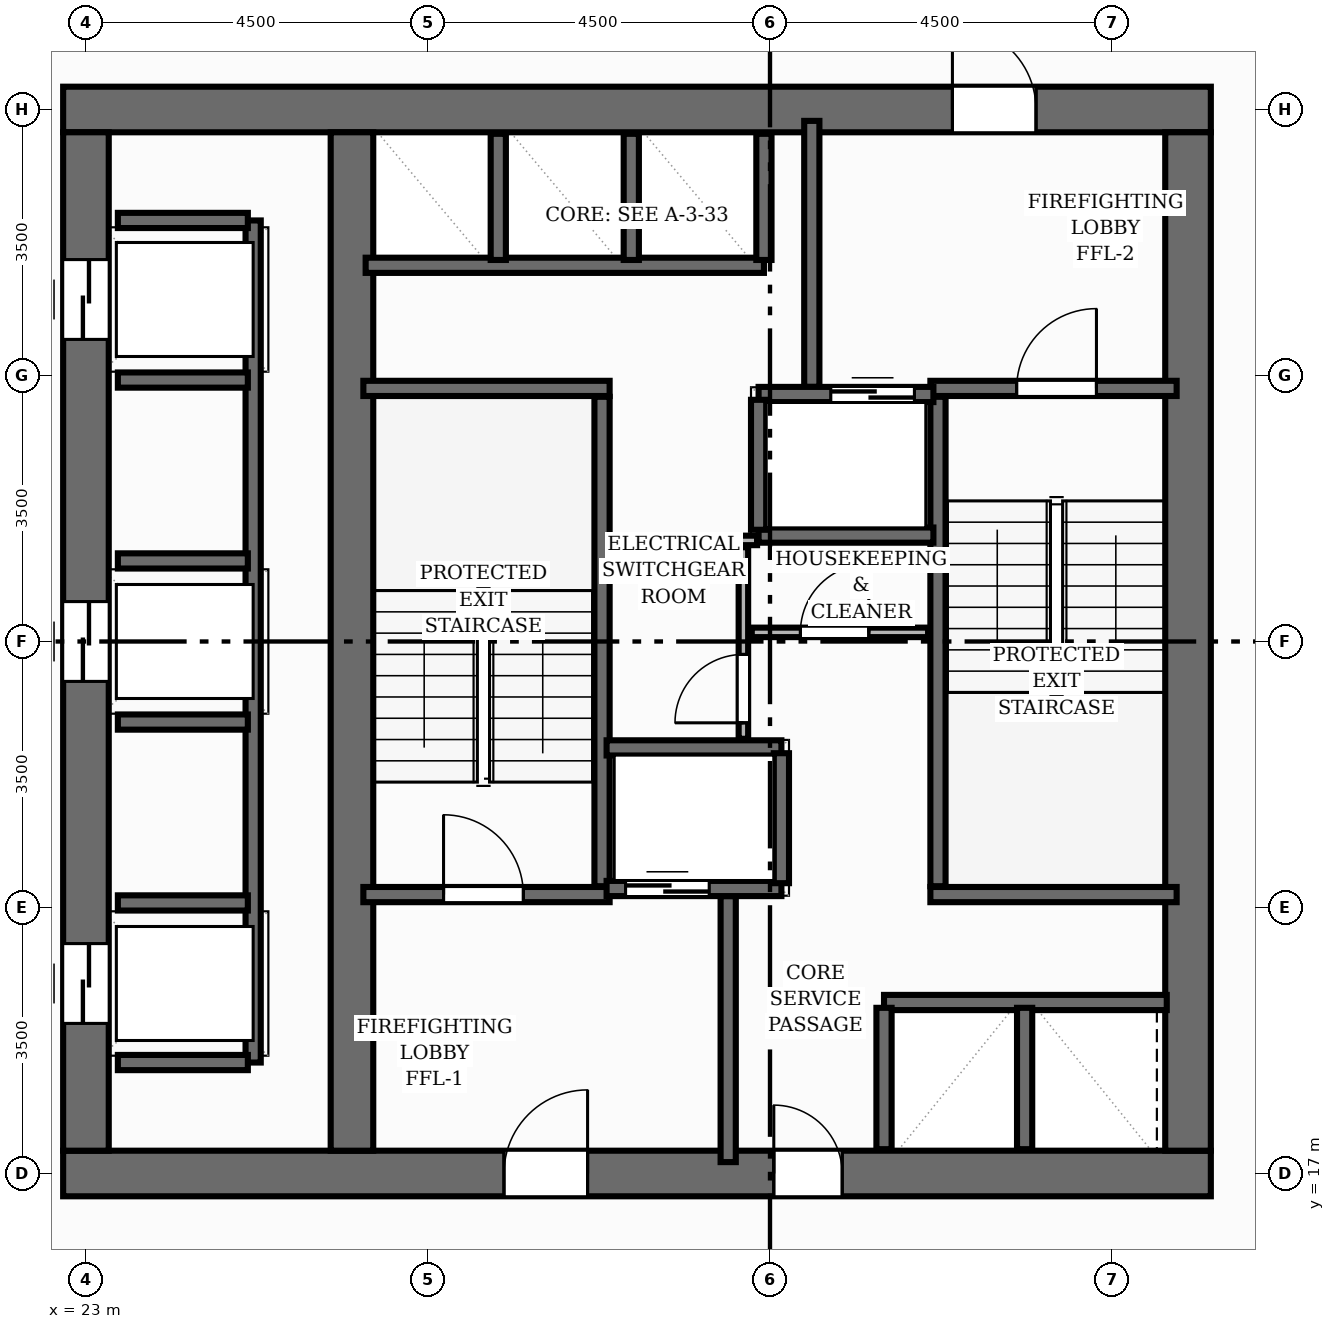
"""IFC4 building model, lengths in metres.
Left out: names, types, materials, properties, quantities, classifications, styles, units other than length and angle.
Written with IfcOpenShell. Run it as: python <this file> out.ifc"""

import sys

from ifc_helpers import new_model, si_unit, direction, frame, frame_2d, origin, place, context, subcontext, project, spatial, rectangle, extrude, element, fill, save


model = new_model("IFC4")
c1 = context("Model", 3, precision=1e-05, world=origin(), true_north=direction((0.0, 1.0)))
c2 = subcontext(c1, "Body", "Model", "MODEL_VIEW")
j1 = project(units=[si_unit("LENGTHUNIT", "METRE"), si_unit("PLANEANGLEUNIT", "RADIAN")], contexts=[c1])
p1 = place(None, origin())
s1 = spatial("IfcSite", under=j1, at=p1, CompositionType="ELEMENT")
p2 = place(p1, origin())
s2 = spatial("IfcBuilding", under=s1, at=p2, CompositionType="ELEMENT")
p3 = place(p2, frame((0.0, 0.0, 132.96)))
s3 = spatial("IfcBuildingStorey", under=s2, at=p3, CompositionType="ELEMENT", Elevation=132.96)
p4 = place(p3, frame((22.7, 17.0, 0.0), z_axis=(0.0, 0.0, 1.0), x_axis=(1.0, 0.0, 0.0)))
e1 = element("IfcWall", 1, at=p4, inside=s3, PredefinedType="SHEAR", context=c2, shape_type="SweptSolid", body=[
    extrude(rectangle(XDim=15.1, YDim=0.6, at=frame_2d((7.55, 0.0))), origin(), (0.0, 0.0, 1.0), 3.2),
])
p5 = place(p4, frame((5.8, 0.0, 0.0)))
e2 = element("IfcOpeningElement", 2, at=p5, cuts=e1, PredefinedType="OPENING", context=c2, shape_type="SweptSolid", body=[
    extrude(rectangle(XDim=1.1, YDim=2.15, at=frame_2d((0.55, 1.075))), frame((0.0, 0.31, 0.0), z_axis=(0.0, -1.0, 0.0), x_axis=(1.0, 0.0, 0.0)), (0.0, 0.0, 1.0), 0.62),
])
p6 = place(p4, frame((9.35, 0.0, 0.0)))
e3 = element("IfcOpeningElement", 3, at=p6, cuts=e1, PredefinedType="OPENING", context=c2, shape_type="SweptSolid", body=[
    extrude(rectangle(XDim=0.9, YDim=2.1, at=frame_2d((0.45, 1.05))), frame((0.0, 0.31, 0.0), z_axis=(0.0, -1.0, 0.0), x_axis=(1.0, 0.0, 0.0)), (0.0, 0.0, 1.0), 0.62),
])
p7 = place(p3, frame((22.7, 31.0, 0.0), z_axis=(0.0, 0.0, 1.0), x_axis=(1.0, 0.0, 0.0)))
e4 = element("IfcWall", 4, at=p7, inside=s3, PredefinedType="SHEAR", context=c2, shape_type="SweptSolid", body=[
    extrude(rectangle(XDim=15.1, YDim=0.6, at=frame_2d((7.55, 0.0))), origin(), (0.0, 0.0, 1.0), 3.2),
])
p8 = place(p7, frame((11.7, 0.0, 0.0)))
e5 = element("IfcOpeningElement", 5, at=p8, cuts=e4, PredefinedType="OPENING", context=c2, shape_type="SweptSolid", body=[
    extrude(rectangle(XDim=1.1, YDim=2.15, at=frame_2d((0.55, 1.075))), frame((0.0, 0.31, 0.0), z_axis=(0.0, -1.0, 0.0), x_axis=(1.0, 0.0, 0.0)), (0.0, 0.0, 1.0), 0.62),
])
p9 = place(p3, frame((23.0, 17.3, 0.0), z_axis=(0.0, 0.0, 1.0), x_axis=(0.0, 1.0, 0.0)))
e6 = element("IfcWall", 6, at=p9, inside=s3, PredefinedType="SHEAR", context=c2, shape_type="SweptSolid", body=[
    extrude(rectangle(XDim=13.4, YDim=0.6, at=frame_2d((6.7, 0.0))), origin(), (0.0, 0.0, 1.0), 3.2),
])
p10 = place(p9, frame((1.675, 0.0, 0.0)))
e7 = element("IfcOpeningElement", 7, at=p10, cuts=e6, PredefinedType="OPENING", context=c2, shape_type="SweptSolid", body=[
    extrude(rectangle(XDim=1.05, YDim=2.15, at=frame_2d((0.525, 1.075))), frame((0.0, 0.31, 0.0), z_axis=(0.0, -1.0, 0.0), x_axis=(1.0, 0.0, 0.0)), (0.0, 0.0, 1.0), 0.62),
])
p11 = place(p9, frame((6.175, 0.0, 0.0)))
e8 = element("IfcOpeningElement", 8, at=p11, cuts=e6, PredefinedType="OPENING", context=c2, shape_type="SweptSolid", body=[
    extrude(rectangle(XDim=1.05, YDim=2.15, at=frame_2d((0.525, 1.075))), frame((0.0, 0.31, 0.0), z_axis=(0.0, -1.0, 0.0), x_axis=(1.0, 0.0, 0.0)), (0.0, 0.0, 1.0), 0.62),
])
p12 = place(p9, frame((10.675, 0.0, 0.0)))
e9 = element("IfcOpeningElement", 9, at=p12, cuts=e6, PredefinedType="OPENING", context=c2, shape_type="SweptSolid", body=[
    extrude(rectangle(XDim=1.05, YDim=2.15, at=frame_2d((0.525, 1.075))), frame((0.0, 0.31, 0.0), z_axis=(0.0, -1.0, 0.0), x_axis=(1.0, 0.0, 0.0)), (0.0, 0.0, 1.0), 0.62),
])
p13 = place(p3, frame((37.5, 17.3, 0.0), z_axis=(0.0, 0.0, 1.0), x_axis=(0.0, 1.0, 0.0)))
e10 = element("IfcWall", 10, at=p13, inside=s3, PredefinedType="SHEAR", context=c2, shape_type="SweptSolid", body=[
    extrude(rectangle(XDim=13.4, YDim=0.6, at=frame_2d((6.7, 0.0))), origin(), (0.0, 0.0, 1.0), 3.2),
])
p14 = place(p3, frame((26.5, 17.3, 0.0), z_axis=(0.0, 0.0, 1.0), x_axis=(0.0, 1.0, 0.0)))
e11 = element("IfcWall", 11, at=p14, inside=s3, PredefinedType="SHEAR", context=c2, shape_type="SweptSolid", body=[
    extrude(rectangle(XDim=13.4, YDim=0.56, at=frame_2d((6.7, 0.0))), origin(), (0.0, 0.0, 1.0), 3.2),
])
p15 = place(p3, frame((29.79, 20.78, 0.0), z_axis=(0.0, 0.0, 1.0), x_axis=(0.0, 1.0, 0.0)))
e12 = element("IfcWall", 12, at=p15, inside=s3, PredefinedType="SHEAR", context=c2, shape_type="SweptSolid", body=[
    extrude(rectangle(XDim=6.44, YDim=0.2, at=frame_2d((3.22, 0.0))), origin(), (0.0, 0.0, 1.0), 3.2),
])
p16 = place(p3, frame((26.65, 27.33, 0.0), z_axis=(0.0, 0.0, 1.0), x_axis=(1.0, 0.0, 0.0)))
e13 = element("IfcWall", 13, at=p16, inside=s3, PredefinedType="SHEAR", context=c2, shape_type="SweptSolid", body=[
    extrude(rectangle(XDim=3.24, YDim=0.2, at=frame_2d((1.62, 0.0))), origin(), (0.0, 0.0, 1.0), 3.2),
])
p17 = place(p3, frame((26.65, 20.67, 0.0), z_axis=(0.0, 0.0, 1.0), x_axis=(1.0, 0.0, 0.0)))
e14 = element("IfcWall", 14, at=p17, inside=s3, PredefinedType="SHEAR", context=c2, shape_type="SweptSolid", body=[
    extrude(rectangle(XDim=3.24, YDim=0.2, at=frame_2d((1.62, 0.0))), origin(), (0.0, 0.0, 1.0), 3.2),
])
p18 = place(p17, frame((1.055, 0.0, 0.0)))
e15 = element("IfcOpeningElement", 15, at=p18, cuts=e14, PredefinedType="OPENING", context=c2, shape_type="SweptSolid", body=[
    extrude(rectangle(XDim=1.05, YDim=2.15, at=frame_2d((0.525, 1.075))), frame((0.0, 0.11, 0.0), z_axis=(0.0, -1.0, 0.0), x_axis=(1.0, 0.0, 0.0)), (0.0, 0.0, 1.0), 0.22),
])
p19 = place(p3, frame((34.21, 20.78, 0.0), z_axis=(0.0, 0.0, 1.0), x_axis=(0.0, 1.0, 0.0)))
e16 = element("IfcWall", 16, at=p19, inside=s3, PredefinedType="SHEAR", context=c2, shape_type="SweptSolid", body=[
    extrude(rectangle(XDim=6.44, YDim=0.2, at=frame_2d((3.22, 0.0))), origin(), (0.0, 0.0, 1.0), 3.2),
])
p20 = place(p3, frame((34.11, 20.67, 0.0), z_axis=(0.0, 0.0, 1.0), x_axis=(1.0, 0.0, 0.0)))
e17 = element("IfcWall", 17, at=p20, inside=s3, PredefinedType="SHEAR", context=c2, shape_type="SweptSolid", body=[
    extrude(rectangle(XDim=3.24, YDim=0.2, at=frame_2d((1.62, 0.0))), origin(), (0.0, 0.0, 1.0), 3.2),
])
p21 = place(p3, frame((34.11, 27.33, 0.0), z_axis=(0.0, 0.0, 1.0), x_axis=(1.0, 0.0, 0.0)))
e18 = element("IfcWall", 18, at=p21, inside=s3, PredefinedType="SHEAR", context=c2, shape_type="SweptSolid", body=[
    extrude(rectangle(XDim=3.24, YDim=0.2, at=frame_2d((1.62, 0.0))), origin(), (0.0, 0.0, 1.0), 3.2),
])
p22 = place(p21, frame((1.135, 0.0, 0.0)))
e19 = element("IfcOpeningElement", 19, at=p22, cuts=e18, PredefinedType="OPENING", context=c2, shape_type="SweptSolid", body=[
    extrude(rectangle(XDim=1.05, YDim=2.15, at=frame_2d((0.525, 1.075))), frame((0.0, 0.11, 0.0), z_axis=(0.0, -1.0, 0.0), x_axis=(1.0, 0.0, 0.0)), (0.0, 0.0, 1.0), 0.22),
])
for number, where, z_axis, x_axis in (
    (20, (31.45, 17.15, 0.0), (0.0, 0.0, 1.0), (0.0, 1.0, 0.0)),
    (21, (32.55, 27.35, 0.0), (0.0, 0.0, 1.0), (0.0, 1.0, 0.0)),
):
    element("IfcWall", number, at=place(p3, frame(where, z_axis=z_axis, x_axis=x_axis)), inside=s3, PredefinedType="SHEAR", context=c2, shape_type="SweptSolid", body=[
        extrude(rectangle(XDim=3.5, YDim=0.2, at=frame_2d((1.75, 0.0))), origin(), (0.0, 0.0, 1.0), 3.2),
    ])
p23 = place(p3, frame((29.85, 20.75, 0.0), z_axis=(0.0, 0.0, 1.0), x_axis=(1.0, 0.0, 0.0)))
e22 = element("IfcWall", 22, at=p23, inside=s3, PredefinedType="SHEAR", context=c2, shape_type="SweptSolid", body=[
    extrude(rectangle(XDim=2.3, YDim=0.2, at=frame_2d((1.15, 0.0))), origin(), (0.0, 0.0, 1.0), 3.2),
])
p24 = place(p23, frame((0.25, 0.0, 0.0)))
e23 = element("IfcOpeningElement", 23, at=p24, cuts=e22, PredefinedType="OPENING", context=c2, shape_type="SweptSolid", body=[
    extrude(rectangle(XDim=1.1, YDim=2.15, at=frame_2d((0.55, 1.075))), frame((0.0, 0.11, 0.0), z_axis=(0.0, -1.0, 0.0), x_axis=(1.0, 0.0, 0.0)), (0.0, 0.0, 1.0), 0.22),
])
p25 = place(p3, frame((29.85, 22.6, 0.0), z_axis=(0.0, 0.0, 1.0), x_axis=(1.0, 0.0, 0.0)))
e24 = element("IfcWall", 24, at=p25, inside=s3, PredefinedType="SHEAR", context=c2, shape_type="SweptSolid", body=[
    extrude(rectangle(XDim=2.3, YDim=0.2, at=frame_2d((1.15, 0.0))), origin(), (0.0, 0.0, 1.0), 3.2),
])
p26 = place(p3, frame((32.15, 20.82, 0.0), z_axis=(0.0, 0.0, 1.0), x_axis=(0.0, 1.0, 0.0)))
e25 = element("IfcWall", 25, at=p26, inside=s3, PredefinedType="SHEAR", context=c2, shape_type="SweptSolid", body=[
    extrude(rectangle(XDim=1.71, YDim=0.2, at=frame_2d((0.855, 0.0))), origin(), (0.0, 0.0, 1.0), 3.2),
])
p27 = place(p3, frame((31.85, 27.25, 0.0), z_axis=(0.0, 0.0, 1.0), x_axis=(1.0, 0.0, 0.0)))
e26 = element("IfcWall", 26, at=p27, inside=s3, PredefinedType="SHEAR", context=c2, shape_type="SweptSolid", body=[
    extrude(rectangle(XDim=2.3, YDim=0.2, at=frame_2d((1.15, 0.0))), origin(), (0.0, 0.0, 1.0), 3.2),
])
p28 = place(p27, frame((0.95, 0.0, 0.0)))
e27 = element("IfcOpeningElement", 27, at=p28, cuts=e26, PredefinedType="OPENING", context=c2, shape_type="SweptSolid", body=[
    extrude(rectangle(XDim=1.1, YDim=2.15, at=frame_2d((0.55, 1.075))), frame((0.0, 0.11, 0.0), z_axis=(0.0, -1.0, 0.0), x_axis=(1.0, 0.0, 0.0)), (0.0, 0.0, 1.0), 0.22),
])
p29 = place(p3, frame((31.85, 25.4, 0.0), z_axis=(0.0, 0.0, 1.0), x_axis=(1.0, 0.0, 0.0)))
e28 = element("IfcWall", 28, at=p29, inside=s3, PredefinedType="SHEAR", context=c2, shape_type="SweptSolid", body=[
    extrude(rectangle(XDim=2.3, YDim=0.2, at=frame_2d((1.15, 0.0))), origin(), (0.0, 0.0, 1.0), 3.2),
])
p30 = place(p3, frame((31.85, 25.47, 0.0), z_axis=(0.0, 0.0, 1.0), x_axis=(0.0, 1.0, 0.0)))
e29 = element("IfcWall", 29, at=p30, inside=s3, PredefinedType="SHEAR", context=c2, shape_type="SweptSolid", body=[
    extrude(rectangle(XDim=1.71, YDim=0.2, at=frame_2d((0.855, 0.0))), origin(), (0.0, 0.0, 1.0), 3.2),
])
p31 = place(p3, frame((25.2, 18.46, 0.0), z_axis=(0.0, 0.0, 1.0), x_axis=(0.0, 1.0, 0.0)))
e30 = element("IfcWall", 30, at=p31, inside=s3, PredefinedType="SHEAR", context=c2, shape_type="SweptSolid", body=[
    extrude(rectangle(XDim=11.08, YDim=0.2, at=frame_2d((5.54, 0.0))), origin(), (0.0, 0.0, 1.0), 3.2),
])
for number, where, z_axis, x_axis in (
    (31, (23.42, 18.46, 0.0), (0.0, 0.0, 1.0), (1.0, 0.0, 0.0)),
    (32, (23.42, 29.54, 0.0), (0.0, 0.0, 1.0), (1.0, 0.0, 0.0)),
    (33, (23.42, 20.56, 0.0), (0.0, 0.0, 1.0), (1.0, 0.0, 0.0)),
    (34, (23.42, 22.94, 0.0), (0.0, 0.0, 1.0), (1.0, 0.0, 0.0)),
    (35, (23.42, 25.06, 0.0), (0.0, 0.0, 1.0), (1.0, 0.0, 0.0)),
    (36, (23.42, 27.44, 0.0), (0.0, 0.0, 1.0), (1.0, 0.0, 0.0)),
):
    element("IfcWall", number, at=place(p3, frame(where, z_axis=z_axis, x_axis=x_axis)), inside=s3, PredefinedType="SHEAR", context=c2, shape_type="SweptSolid", body=[
        extrude(rectangle(XDim=1.71, YDim=0.2, at=frame_2d((0.855, 0.0))), origin(), (0.0, 0.0, 1.0), 3.2),
    ])
p32 = place(p3, frame((26.68, 28.95, 0.0), z_axis=(0.0, 0.0, 1.0), x_axis=(1.0, 0.0, 0.0)))
e37 = element("IfcWall", 37, at=p32, inside=s3, PredefinedType="SHEAR", context=c2, shape_type="SweptSolid", body=[
    extrude(rectangle(XDim=5.24, YDim=0.2, at=frame_2d((2.62, 0.0))), origin(), (0.0, 0.0, 1.0), 3.2),
])
for number, where, z_axis, x_axis in (
    (38, (31.92, 29.02, 0.0), (0.0, 0.0, 1.0), (0.0, 1.0, 0.0)),
    (39, (28.425, 29.02, 0.0), (0.0, 0.0, 1.0), (0.0, 1.0, 0.0)),
    (40, (30.175, 29.02, 0.0), (0.0, 0.0, 1.0), (0.0, 1.0, 0.0)),
):
    element("IfcWall", number, at=place(p3, frame(where, z_axis=z_axis, x_axis=x_axis)), inside=s3, PredefinedType="SHEAR", context=c2, shape_type="SweptSolid", body=[
        extrude(rectangle(XDim=1.66, YDim=0.2, at=frame_2d((0.83, 0.0))), origin(), (0.0, 0.0, 1.0), 3.2),
    ])
p33 = place(p3, frame((33.5, 19.25, 0.0), z_axis=(0.0, 0.0, 1.0), x_axis=(1.0, 0.0, 0.0)))
e41 = element("IfcWall", 41, at=p33, inside=s3, PredefinedType="SHEAR", context=c2, shape_type="SweptSolid", body=[
    extrude(rectangle(XDim=3.72, YDim=0.2, at=frame_2d((1.86, 0.0))), origin(), (0.0, 0.0, 1.0), 3.2),
])
for number, where, z_axis, x_axis in (
    (42, (33.5, 17.32, 0.0), (0.0, 0.0, 1.0), (0.0, 1.0, 0.0)),
    (43, (35.35, 17.32, 0.0), (0.0, 0.0, 1.0), (0.0, 1.0, 0.0)),
):
    element("IfcWall", number, at=place(p3, frame(where, z_axis=z_axis, x_axis=x_axis)), inside=s3, PredefinedType="SHEAR", context=c2, shape_type="SweptSolid", body=[
        extrude(rectangle(XDim=1.86, YDim=0.2, at=frame_2d((0.93, 0.0))), origin(), (0.0, 0.0, 1.0), 3.2),
    ])
p34 = place(p3, frame((31.65, 22.72, 0.0), z_axis=(0.0, 0.0, 1.0), x_axis=(0.0, 1.0, 0.0)))
e44 = element("IfcWall", 44, at=p34, inside=s3, PredefinedType="PARTITIONING", context=c2, shape_type="SweptSolid", body=[
    extrude(rectangle(XDim=2.52, YDim=0.125, at=frame_2d((1.26, 0.0))), origin(), (0.0, 0.0, 1.0), 2.955),
])
p35 = place(p34, frame((0.21, 0.0, 0.0)))
e45 = element("IfcOpeningElement", 45, at=p35, cuts=e44, PredefinedType="OPENING", context=c2, shape_type="SweptSolid", body=[
    extrude(rectangle(XDim=0.9, YDim=2.1, at=frame_2d((0.45, 1.05))), frame((0.0, 0.073, 0.0), z_axis=(0.0, -1.0, 0.0), x_axis=(1.0, 0.0, 0.0)), (0.0, 0.0, 1.0), 0.145),
])
p36 = place(p3, frame((31.76, 24.12, 0.0), z_axis=(0.0, 0.0, 1.0), x_axis=(1.0, 0.0, 0.0)))
e46 = element("IfcWall", 46, at=p36, inside=s3, PredefinedType="PARTITIONING", context=c2, shape_type="SweptSolid", body=[
    extrude(rectangle(XDim=2.32, YDim=0.125, at=frame_2d((1.16, 0.0))), origin(), (0.0, 0.0, 1.0), 2.955),
])
p37 = place(p36, frame((0.64, 0.0, 0.0)))
e47 = element("IfcOpeningElement", 47, at=p37, cuts=e46, PredefinedType="OPENING", context=c2, shape_type="SweptSolid", body=[
    extrude(rectangle(XDim=0.9, YDim=2.1, at=frame_2d((0.45, 1.05))), frame((0.0, 0.073, 0.0), z_axis=(0.0, -1.0, 0.0), x_axis=(1.0, 0.0, 0.0)), (0.0, 0.0, 1.0), 0.145),
])
p38 = place(p3, frame((29.89, 25.33, 0.0), z_axis=(0.0, 0.0, 1.0), x_axis=(1.0, 0.0, 0.0)))
e48 = element("IfcWall", 48, at=p38, inside=s3, PredefinedType="PARTITIONING", context=c2, shape_type="SweptSolid", body=[
    extrude(rectangle(XDim=1.94, YDim=0.125, at=frame_2d((0.97, 0.0))), origin(), (0.0, 0.0, 1.0), 2.955),
])
p39 = place(p18, origin())
e49 = element("IfcDoor", 49, at=p39, inside=s3, OperationType="SINGLE_SWING_LEFT", PredefinedType="DOOR", context=c2, shape_type="SweptSolid", body=[
    extrude(rectangle(XDim=1.05, YDim=2.15, at=frame_2d((0.525, 1.075))), frame((0.0, 0.025, 0.0), z_axis=(0.0, -1.0, 0.0), x_axis=(1.0, 0.0, 0.0)), (0.0, 0.0, 1.0), 0.05),
])
fill(e15, e49)
p40 = place(p22, origin())
e50 = element("IfcDoor", 50, at=p40, inside=s3, OperationType="SINGLE_SWING_RIGHT", PredefinedType="DOOR", context=c2, shape_type="SweptSolid", body=[
    extrude(rectangle(XDim=1.05, YDim=2.15, at=frame_2d((0.525, 1.075))), frame((0.0, 0.025, 0.0), z_axis=(0.0, -1.0, 0.0), x_axis=(1.0, 0.0, 0.0)), (0.0, 0.0, 1.0), 0.05),
])
fill(e19, e50)
p41 = place(p5, origin())
e51 = element("IfcDoor", 51, at=p41, inside=s3, OperationType="SINGLE_SWING_RIGHT", PredefinedType="DOOR", context=c2, shape_type="SweptSolid", body=[
    extrude(rectangle(XDim=1.1, YDim=2.15, at=frame_2d((0.55, 1.075))), frame((0.0, 0.025, 0.0), z_axis=(0.0, -1.0, 0.0), x_axis=(1.0, 0.0, 0.0)), (0.0, 0.0, 1.0), 0.05),
])
fill(e2, e51)
p42 = place(p8, origin())
e52 = element("IfcDoor", 52, at=p42, inside=s3, OperationType="SINGLE_SWING_LEFT", PredefinedType="DOOR", context=c2, shape_type="SweptSolid", body=[
    extrude(rectangle(XDim=1.1, YDim=2.15, at=frame_2d((0.55, 1.075))), frame((0.0, 0.025, 0.0), z_axis=(0.0, -1.0, 0.0), x_axis=(1.0, 0.0, 0.0)), (0.0, 0.0, 1.0), 0.05),
])
fill(e5, e52)
p43 = place(p24, origin())
e53 = element("IfcDoor", 53, at=p43, inside=s3, OperationType="DOUBLE_DOOR_SLIDING", PredefinedType="DOOR", context=c2, shape_type="SweptSolid", body=[
    extrude(rectangle(XDim=1.1, YDim=2.15, at=frame_2d((0.55, 1.075))), frame((0.0, 0.025, 0.0), z_axis=(0.0, -1.0, 0.0), x_axis=(1.0, 0.0, 0.0)), (0.0, 0.0, 1.0), 0.05),
])
fill(e23, e53)
p44 = place(p28, origin())
e54 = element("IfcDoor", 54, at=p44, inside=s3, OperationType="DOUBLE_DOOR_SLIDING", PredefinedType="DOOR", context=c2, shape_type="SweptSolid", body=[
    extrude(rectangle(XDim=1.1, YDim=2.15, at=frame_2d((0.55, 1.075))), frame((0.0, 0.025, 0.0), z_axis=(0.0, -1.0, 0.0), x_axis=(1.0, 0.0, 0.0)), (0.0, 0.0, 1.0), 0.05),
])
fill(e27, e54)
p45 = place(p10, origin())
e55 = element("IfcDoor", 55, at=p45, inside=s3, OperationType="DOUBLE_DOOR_SLIDING", PredefinedType="DOOR", context=c2, shape_type="SweptSolid", body=[
    extrude(rectangle(XDim=1.05, YDim=2.15, at=frame_2d((0.525, 1.075))), frame((0.0, 0.025, 0.0), z_axis=(0.0, -1.0, 0.0), x_axis=(1.0, 0.0, 0.0)), (0.0, 0.0, 1.0), 0.05),
])
fill(e7, e55)
p46 = place(p11, origin())
e56 = element("IfcDoor", 56, at=p46, inside=s3, OperationType="DOUBLE_DOOR_SLIDING", PredefinedType="DOOR", context=c2, shape_type="SweptSolid", body=[
    extrude(rectangle(XDim=1.05, YDim=2.15, at=frame_2d((0.525, 1.075))), frame((0.0, 0.025, 0.0), z_axis=(0.0, -1.0, 0.0), x_axis=(1.0, 0.0, 0.0)), (0.0, 0.0, 1.0), 0.05),
])
fill(e8, e56)
p47 = place(p12, origin())
e57 = element("IfcDoor", 57, at=p47, inside=s3, OperationType="DOUBLE_DOOR_SLIDING", PredefinedType="DOOR", context=c2, shape_type="SweptSolid", body=[
    extrude(rectangle(XDim=1.05, YDim=2.15, at=frame_2d((0.525, 1.075))), frame((0.0, 0.025, 0.0), z_axis=(0.0, -1.0, 0.0), x_axis=(1.0, 0.0, 0.0)), (0.0, 0.0, 1.0), 0.05),
])
fill(e9, e57)
p48 = place(p6, origin())
e58 = element("IfcDoor", 58, at=p48, inside=s3, OperationType="SINGLE_SWING_LEFT", PredefinedType="DOOR", context=c2, shape_type="SweptSolid", body=[
    extrude(rectangle(XDim=0.9, YDim=2.1, at=frame_2d((0.45, 1.05))), frame((0.0, 0.025, 0.0), z_axis=(0.0, -1.0, 0.0), x_axis=(1.0, 0.0, 0.0)), (0.0, 0.0, 1.0), 0.05),
])
fill(e3, e58)
p49 = place(p35, origin())
e59 = element("IfcDoor", 59, at=p49, inside=s3, OperationType="SINGLE_SWING_LEFT", PredefinedType="DOOR", context=c2, shape_type="SweptSolid", body=[
    extrude(rectangle(XDim=0.9, YDim=2.1, at=frame_2d((0.45, 1.05))), frame((0.0, 0.025, 0.0), z_axis=(0.0, -1.0, 0.0), x_axis=(1.0, 0.0, 0.0)), (0.0, 0.0, 1.0), 0.05),
])
fill(e45, e59)
p50 = place(p37, origin())
e60 = element("IfcDoor", 60, at=p50, inside=s3, OperationType="SINGLE_SWING_RIGHT", PredefinedType="DOOR", context=c2, shape_type="SweptSolid", body=[
    extrude(rectangle(XDim=0.9, YDim=2.1, at=frame_2d((0.45, 1.05))), frame((0.0, 0.025, 0.0), z_axis=(0.0, -1.0, 0.0), x_axis=(1.0, 0.0, 0.0)), (0.0, 0.0, 1.0), 0.05),
])
fill(e47, e60)
save(model, sys.argv[1])
